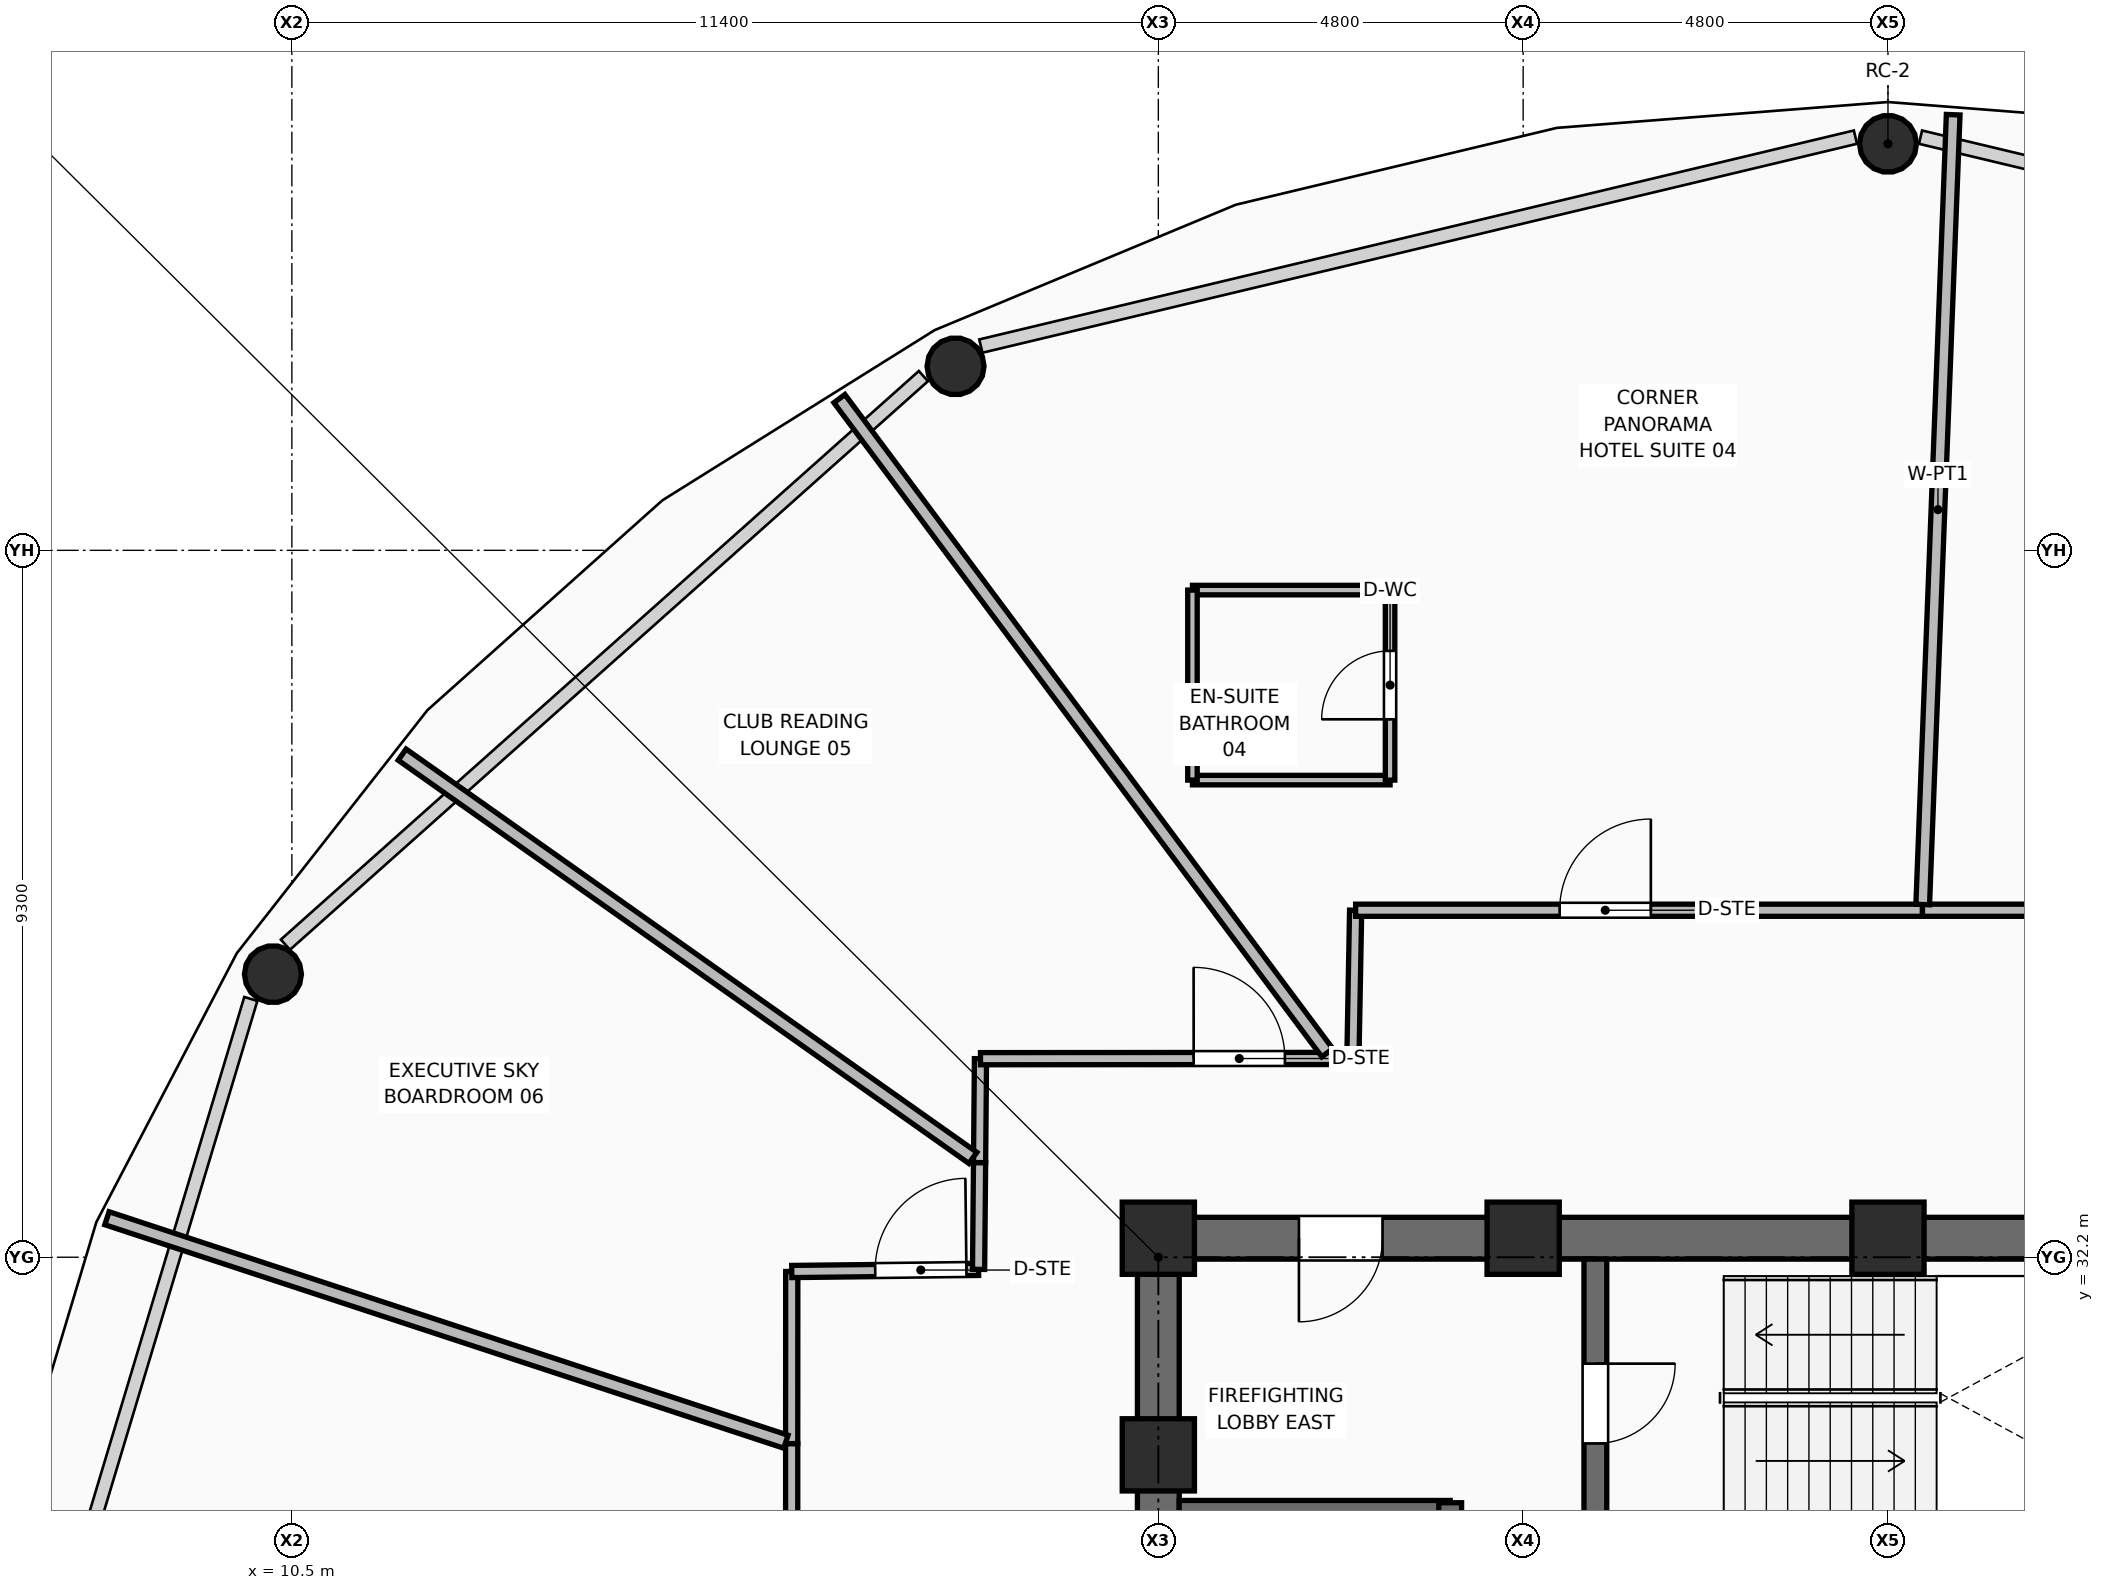
"""IFC4 building model, lengths in metres.
Left out: names, types, materials, properties, quantities, classifications, styles, units other than length and angle.
Written with IfcOpenShell. Run it as: python <this file> out.ifc"""

import sys

from ifc_helpers import new_model, si_unit, direction, frame, frame_2d, origin, origin_2d, place, context, subcontext, project, spatial, rectangle, hollow_circle, extrude, element, fill, save


model = new_model("IFC4")
c1 = context("Model", 3, precision=1e-05, world=origin(), true_north=direction((0.0, 1.0)))
c2 = subcontext(c1, "Body", "Model", "MODEL_VIEW")
j1 = project(units=[si_unit("LENGTHUNIT", "METRE"), si_unit("PLANEANGLEUNIT", "RADIAN")], contexts=[c1])
p1 = place(None, origin())
s1 = spatial("IfcSite", under=j1, at=p1, CompositionType="ELEMENT")
p2 = place(p1, origin())
s2 = spatial("IfcBuilding", under=s1, at=p2, CompositionType="ELEMENT")
p3 = place(p2, frame((0.0, 0.0, 168.45)))
s3 = spatial("IfcBuildingStorey", under=s2, at=p3, CompositionType="ELEMENT", Elevation=168.45)
for number, where, z_axis, x_axis in (
    (1, (21.9, 29.6, 0.0), (0.0, 0.0, 1.0), (1.0, 0.0, 0.0)),
    (2, (21.9, 32.45, 0.0), (0.0, 0.0, 1.0), (1.0, 0.0, 0.0)),
    (3, (26.7, 32.45, 0.0), (0.0, 0.0, 1.0), (1.0, 0.0, 0.0)),
    (4, (31.5, 32.45, 0.0), (0.0, 0.0, 1.0), (1.0, 0.0, 0.0)),
):
    element("IfcColumn", number, at=place(p3, frame(where, z_axis=z_axis, x_axis=x_axis)), inside=s3, PredefinedType="COLUMN", context=c2, shape_type="SweptSolid", body=[
        extrude(rectangle(XDim=0.95, YDim=0.95, at=origin_2d()), origin(), (0.0, 0.0, 1.0), 3.75),
    ])
for number, where, z_axis, x_axis in (
    (5, (31.5, 46.848, 0.0), (0.0, 0.0, 1.0), (1.0, 0.0, 0.0)),
    (6, (19.232, 43.921, 0.0), (0.0, 0.0, 1.0), (1.0, 0.0, 0.0)),
    (7, (10.251, 35.924, 0.0), (0.0, 0.0, 1.0), (1.0, 0.0, 0.0)),
):
    element("IfcColumn", number, at=place(p3, frame(where, z_axis=z_axis, x_axis=x_axis)), inside=s3, PredefinedType="COLUMN", context=c2, shape_type="SweptSolid", body=[
        extrude(hollow_circle(Radius=0.375, WallThickness=0.035, at=origin_2d()), origin(), (0.0, 0.0, 1.0), 3.57),
    ])
p4 = place(p3, frame((21.625, 32.45, 0.0), z_axis=(0.0, 0.0, 1.0), x_axis=(1.0, 0.0, 0.0)))
e8 = element("IfcWall", 8, at=p4, inside=s3, PredefinedType="SHEAR", context=c2, shape_type="SweptSolid", body=[
    extrude(rectangle(XDim=19.75, YDim=0.55, at=frame_2d((9.875, 0.0))), origin(), (0.0, 0.0, 1.0), 3.57),
])
p5 = place(p4, frame((2.125, 0.0, 0.0)))
e9 = element("IfcOpeningElement", 9, at=p5, cuts=e8, PredefinedType="OPENING", context=c2, shape_type="SweptSolid", body=[
    extrude(rectangle(XDim=1.1, YDim=2.1, at=frame_2d((0.55, 1.05))), frame((0.0, 0.285, 0.0), z_axis=(0.0, -1.0, 0.0), x_axis=(1.0, 0.0, 0.0)), (0.0, 0.0, 1.0), 0.57),
])
p6 = place(p4, frame((15.515, 0.0, 0.0)))
e10 = element("IfcOpeningElement", 10, at=p6, cuts=e8, PredefinedType="OPENING", context=c2, shape_type="SweptSolid", body=[
    extrude(rectangle(XDim=1.0, YDim=2.1, at=frame_2d((0.5, 1.05))), frame((0.0, 0.285, 0.0), z_axis=(0.0, -1.0, 0.0), x_axis=(1.0, 0.0, 0.0)), (0.0, 0.0, 1.0), 0.57),
])
p7 = place(p4, frame((17.525, 0.0, 0.0)))
e11 = element("IfcOpeningElement", 11, at=p7, cuts=e8, PredefinedType="OPENING", context=c2, shape_type="SweptSolid", body=[
    extrude(rectangle(XDim=0.9, YDim=2.1, at=frame_2d((0.45, 1.05))), frame((0.0, 0.285, 0.0), z_axis=(0.0, -1.0, 0.0), x_axis=(1.0, 0.0, 0.0)), (0.0, 0.0, 1.0), 0.57),
])
p8 = place(p3, frame((21.9, 18.075, 0.0), z_axis=(0.0, 0.0, 1.0), x_axis=(0.0, 1.0, 0.0)))
e12 = element("IfcWall", 12, at=p8, inside=s3, PredefinedType="SHEAR", context=c2, shape_type="SweptSolid", body=[
    extrude(rectangle(XDim=14.1, YDim=0.55, at=frame_2d((7.05, 0.0))), origin(), (0.0, 0.0, 1.0), 3.57),
])
p9 = place(p3, frame((22.175, 28.85, 0.0), z_axis=(0.0, 0.0, 1.0), x_axis=(1.0, 0.0, 0.0)))
e13 = element("IfcWall", 13, at=p9, inside=s3, PredefinedType="SHEAR", context=c2, shape_type="SweptSolid", body=[
    extrude(rectangle(XDim=3.565, YDim=0.3, at=frame_2d((1.782, 0.0))), origin(), (0.0, 0.0, 1.0), 3.57),
])
p10 = place(p3, frame((25.74, 20.98, 0.0), z_axis=(0.0, 0.0, 1.0), x_axis=(0.0, 1.0, 0.0)))
e14 = element("IfcWall", 14, at=p10, inside=s3, PredefinedType="SHEAR", context=c2, shape_type="SweptSolid", body=[
    extrude(rectangle(XDim=7.99, YDim=0.3, at=frame_2d((3.995, 0.0))), origin(), (0.0, 0.0, 1.0), 3.57),
])
p11 = place(p3, frame((27.65, 28.75, 0.0), z_axis=(0.0, 0.0, 1.0), x_axis=(0.0, 1.0, 0.0)))
e15 = element("IfcWall", 15, at=p11, inside=s3, PredefinedType="SHEAR", context=c2, shape_type="SweptSolid", body=[
    extrude(rectangle(XDim=3.425, YDim=0.3, at=frame_2d((1.712, 0.0))), origin(), (0.0, 0.0, 1.0), 3.57),
])
p12 = place(p11, frame((1.0, 0.0, 0.0)))
e16 = element("IfcOpeningElement", 16, at=p12, cuts=e15, PredefinedType="OPENING", context=c2, shape_type="SweptSolid", body=[
    extrude(rectangle(XDim=1.05, YDim=2.1, at=frame_2d((0.525, 1.05))), frame((0.0, 0.16, 0.0), z_axis=(0.0, -1.0, 0.0), x_axis=(1.0, 0.0, 0.0)), (0.0, 0.0, 1.0), 0.32),
])
p13 = place(p3, frame((17.076, 26.142, 0.0), z_axis=(0.0, 0.0, 1.0), x_axis=(0.0, 1.0, 0.0)))
e17 = element("IfcWall", 17, at=p13, inside=s3, PredefinedType="PARTITIONING", context=c2, shape_type="SweptSolid", body=[
    extrude(rectangle(XDim=3.606, YDim=0.16, at=frame_2d((1.803, 0.0))), origin(), (0.0, 0.0, 1.0), 3.55),
])
p14 = place(p3, frame((17.076, 29.748, 0.0), z_axis=(0.0, 0.0, 1.0), x_axis=(0.000431359822, 0.999999906964, 0.0)))
e18 = element("IfcWall", 18, at=p14, inside=s3, PredefinedType="PARTITIONING", context=c2, shape_type="SweptSolid", body=[
    extrude(rectangle(XDim=2.264, YDim=0.16, at=frame_2d((1.132, 0.0))), origin(), (0.0, 0.0, 1.0), 3.55),
])
p15 = place(p3, frame((17.077, 32.012, 0.0), z_axis=(0.0, 0.0, 1.0), x_axis=(0.999934771592, 0.011421583108, 0.0)))
e19 = element("IfcWall", 19, at=p15, inside=s3, PredefinedType="PARTITIONING", context=c2, shape_type="SweptSolid", body=[
    extrude(rectangle(XDim=2.458, YDim=0.16, at=frame_2d((1.229, 0.0))), origin(), (0.0, 0.0, 1.0), 3.55),
])
p16 = place(p15, frame((1.098, 0.0, 0.0)))
e20 = element("IfcOpeningElement", 20, at=p16, cuts=e19, PredefinedType="OPENING", context=c2, shape_type="SweptSolid", body=[
    extrude(rectangle(XDim=1.2, YDim=2.1, at=frame_2d((0.6, 1.05))), frame((0.0, 0.09, 0.0), z_axis=(0.0, -1.0, 0.0), x_axis=(1.0, 0.0, 0.0)), (0.0, 0.0, 1.0), 0.18),
])
p17 = place(p3, frame((19.535, 32.04, 0.0), z_axis=(0.0, 0.0, 1.0), x_axis=(0.009382732056, 0.999955981201, 0.0)))
e21 = element("IfcWall", 21, at=p17, inside=s3, PredefinedType="PARTITIONING", context=c2, shape_type="SweptSolid", body=[
    extrude(rectangle(XDim=1.405, YDim=0.16, at=frame_2d((0.703, 0.0))), origin(), (0.0, 0.0, 1.0), 3.006),
])
p18 = place(p3, frame((19.548, 33.445, 0.0), z_axis=(0.0, 0.0, 1.0), x_axis=(0.008751227658, 0.999961707274, 0.0)))
e22 = element("IfcWall", 22, at=p18, inside=s3, PredefinedType="PARTITIONING", context=c2, shape_type="SweptSolid", body=[
    extrude(rectangle(XDim=1.367, YDim=0.16, at=frame_2d((0.684, 0.0))), origin(), (0.0, 0.0, 1.0), 3.55),
])
p19 = place(p3, frame((19.56, 34.812, 0.0), z_axis=(0.0, 0.0, 1.0), x_axis=(0.999999821253, 0.000597907217, 0.0)))
e23 = element("IfcWall", 23, at=p19, inside=s3, PredefinedType="PARTITIONING", context=c2, shape_type="SweptSolid", body=[
    extrude(rectangle(XDim=4.9, YDim=0.16, at=frame_2d((2.45, 0.0))), origin(), (0.0, 0.0, 1.0), 3.006),
])
p20 = place(p19, frame((2.805, 0.0, 0.0)))
e24 = element("IfcOpeningElement", 24, at=p20, cuts=e23, PredefinedType="OPENING", context=c2, shape_type="SweptSolid", body=[
    extrude(rectangle(XDim=1.2, YDim=2.1, at=frame_2d((0.6, 1.05))), frame((0.0, 0.09, 0.0), z_axis=(0.0, -1.0, 0.0), x_axis=(1.0, 0.0, 0.0)), (0.0, 0.0, 1.0), 0.18),
])
p21 = place(p3, frame((24.46, 34.815, 0.0), z_axis=(0.0, 0.0, 1.0), x_axis=(0.018526930954, 0.999828361685, 0.0)))
e25 = element("IfcWall", 25, at=p21, inside=s3, PredefinedType="PARTITIONING", context=c2, shape_type="SweptSolid", body=[
    extrude(rectangle(XDim=1.95, YDim=0.16, at=frame_2d((0.975, 0.0))), origin(), (0.0, 0.0, 1.0), 3.55),
])
p22 = place(p3, frame((24.496, 36.765, 0.0), z_axis=(0.0, 0.0, 1.0), x_axis=(1.0, 0.0, 0.0)))
e26 = element("IfcWall", 26, at=p22, inside=s3, PredefinedType="PARTITIONING", context=c2, shape_type="SweptSolid", body=[
    extrude(rectangle(XDim=7.458, YDim=0.16, at=frame_2d((3.729, 0.0))), origin(), (0.0, 0.0, 1.0), 3.006),
])
p23 = place(p22, frame((2.684, 0.0, 0.0)))
e27 = element("IfcOpeningElement", 27, at=p23, cuts=e26, PredefinedType="OPENING", context=c2, shape_type="SweptSolid", body=[
    extrude(rectangle(XDim=1.2, YDim=2.1, at=frame_2d((0.6, 1.05))), frame((0.0, 0.09, 0.0), z_axis=(0.0, -1.0, 0.0), x_axis=(1.0, 0.0, 0.0)), (0.0, 0.0, 1.0), 0.18),
])
p24 = place(p3, frame((31.954, 36.765, 0.0), z_axis=(0.0, 0.0, 1.0), x_axis=(1.0, 0.0, 0.0)))
e28 = element("IfcWall", 28, at=p24, inside=s3, PredefinedType="PARTITIONING", context=c2, shape_type="SweptSolid", body=[
    extrude(rectangle(XDim=6.546, YDim=0.16, at=frame_2d((3.273, 0.0))), origin(), (0.0, 0.0, 1.0), 3.55),
])
p25 = place(p24, frame((3.708, 0.0, 0.0)))
e29 = element("IfcOpeningElement", 29, at=p25, cuts=e28, PredefinedType="OPENING", context=c2, shape_type="SweptSolid", body=[
    extrude(rectangle(XDim=1.2, YDim=2.1, at=frame_2d((0.6, 1.05))), frame((0.0, 0.09, 0.0), z_axis=(0.0, -1.0, 0.0), x_axis=(1.0, 0.0, 0.0)), (0.0, 0.0, 1.0), 0.18),
])
p26 = place(p3, frame((31.957, 36.84, 0.0), z_axis=(0.0, 0.0, 1.0), x_axis=(0.038551241221, 0.999256624597, 0.0)))
e30 = element("IfcWall", 30, at=p26, inside=s3, PredefinedType="PARTITIONING", context=c2, shape_type="SweptSolid", body=[
    extrude(rectangle(XDim=10.399, YDim=0.18, at=frame_2d((5.199, 0.0))), origin(), (0.0, 0.0, 1.0), 2.852),
])
p27 = place(p3, frame((24.123, 34.89, 0.0), z_axis=(0.0, 0.0, 1.0), x_axis=(-0.597869450308, 0.80159348824, 0.0)))
e31 = element("IfcWall", 31, at=p27, inside=s3, PredefinedType="PARTITIONING", context=c2, shape_type="SweptSolid", body=[
    extrude(rectangle(XDim=10.736, YDim=0.18, at=frame_2d((5.368, 0.0))), origin(), (0.0, 0.0, 1.0), 2.852),
])
p28 = place(p3, frame((19.46, 33.507, 0.0), z_axis=(0.0, 0.0, 1.0), x_axis=(-0.816740398998, 0.577005303827, 0.0)))
e32 = element("IfcWall", 32, at=p28, inside=s3, PredefinedType="PARTITIONING", context=c2, shape_type="SweptSolid", body=[
    extrude(rectangle(XDim=9.194, YDim=0.18, at=frame_2d((4.597, 0.0))), origin(), (0.0, 0.0, 1.0), 2.852),
])
p29 = place(p3, frame((17.0, 29.773, 0.0), z_axis=(0.0, 0.0, 1.0), x_axis=(-0.949880965401, 0.312611822502, 0.0)))
e33 = element("IfcWall", 33, at=p29, inside=s3, PredefinedType="PARTITIONING", context=c2, shape_type="SweptSolid", body=[
    extrude(rectangle(XDim=9.405, YDim=0.18, at=frame_2d((4.702, 0.0))), origin(), (0.0, 0.0, 1.0), 2.852),
])
for number, where, z_axis, x_axis in (
    (34, (22.349, 38.477, 0.0), (0.0, 0.0, 1.0), (1.0, 0.0, 0.0)),
    (35, (22.349, 40.977, 0.0), (0.0, 0.0, 1.0), (1.0, 0.0, 0.0)),
):
    element("IfcWall", number, at=place(p3, frame(where, z_axis=z_axis, x_axis=x_axis)), inside=s3, PredefinedType="PARTITIONING", context=c2, shape_type="SweptSolid", body=[
        extrude(rectangle(XDim=2.6, YDim=0.125, at=frame_2d((1.3, 0.0))), origin(), (0.0, 0.0, 1.0), 3.55),
    ])
p30 = place(p3, frame((22.349, 38.477, 0.0), z_axis=(0.0, 0.0, 1.0), x_axis=(0.0, 1.0, 0.0)))
e36 = element("IfcWall", 36, at=p30, inside=s3, PredefinedType="PARTITIONING", context=c2, shape_type="SweptSolid", body=[
    extrude(rectangle(XDim=2.5, YDim=0.125, at=frame_2d((1.25, 0.0))), origin(), (0.0, 0.0, 1.0), 3.55),
])
p31 = place(p3, frame((24.949, 38.477, 0.0), z_axis=(0.0, 0.0, 1.0), x_axis=(0.0, 1.0, 0.0)))
e37 = element("IfcWall", 37, at=p31, inside=s3, PredefinedType="PARTITIONING", context=c2, shape_type="SweptSolid", body=[
    extrude(rectangle(XDim=2.5, YDim=0.125, at=frame_2d((1.25, 0.0))), origin(), (0.0, 0.0, 1.0), 3.55),
])
p32 = place(p31, frame((0.8, 0.0, 0.0)))
e38 = element("IfcOpeningElement", 38, at=p32, cuts=e37, PredefinedType="OPENING", context=c2, shape_type="SweptSolid", body=[
    extrude(rectangle(XDim=0.9, YDim=2.1, at=frame_2d((0.45, 1.05))), frame((0.0, 0.073, 0.0), z_axis=(0.0, -1.0, 0.0), x_axis=(1.0, 0.0, 0.0)), (0.0, 0.0, 1.0), 0.145),
])
p33 = place(p12, frame((1.05, 0.0, 0.0), z_axis=(0.0, 0.0, 1.0), x_axis=(-1.0, 0.0, 0.0)))
e39 = element("IfcDoor", 39, at=p33, inside=s3, OperationType="SINGLE_SWING_LEFT", PredefinedType="DOOR", context=c2, shape_type="SweptSolid", body=[
    extrude(rectangle(XDim=1.05, YDim=2.1, at=frame_2d((0.525, 1.05))), frame((0.0, 0.025, 0.0), z_axis=(0.0, -1.0, 0.0), x_axis=(1.0, 0.0, 0.0)), (0.0, 0.0, 1.0), 0.05),
])
fill(e16, e39)
p34 = place(p5, frame((1.1, 0.0, 0.0), z_axis=(0.0, 0.0, 1.0), x_axis=(-1.0, 0.0, 0.0)))
e40 = element("IfcDoor", 40, at=p34, inside=s3, OperationType="SINGLE_SWING_RIGHT", PredefinedType="DOOR", context=c2, shape_type="SweptSolid", body=[
    extrude(rectangle(XDim=1.1, YDim=2.1, at=frame_2d((0.55, 1.05))), frame((0.0, 0.025, 0.0), z_axis=(0.0, -1.0, 0.0), x_axis=(1.0, 0.0, 0.0)), (0.0, 0.0, 1.0), 0.05),
])
fill(e9, e40)
p35 = place(p32, origin())
e41 = element("IfcDoor", 41, at=p35, inside=s3, OperationType="SINGLE_SWING_LEFT", PredefinedType="DOOR", context=c2, shape_type="SweptSolid", body=[
    extrude(rectangle(XDim=0.9, YDim=2.1, at=frame_2d((0.45, 1.05))), frame((0.0, 0.025, 0.0), z_axis=(0.0, -1.0, 0.0), x_axis=(1.0, 0.0, 0.0)), (0.0, 0.0, 1.0), 0.05),
])
fill(e38, e41)
p36 = place(p23, origin())
e42 = element("IfcDoor", 42, at=p36, inside=s3, OperationType="SINGLE_SWING_RIGHT", PredefinedType="DOOR", context=c2, shape_type="SweptSolid", body=[
    extrude(rectangle(XDim=1.2, YDim=2.1, at=frame_2d((0.6, 1.05))), frame((0.0, 0.025, 0.0), z_axis=(0.0, -1.0, 0.0), x_axis=(1.0, 0.0, 0.0)), (0.0, 0.0, 1.0), 0.05),
])
fill(e27, e42)
p37 = place(p20, origin())
e43 = element("IfcDoor", 43, at=p37, inside=s3, OperationType="SINGLE_SWING_LEFT", PredefinedType="DOOR", context=c2, shape_type="SweptSolid", body=[
    extrude(rectangle(XDim=1.2, YDim=2.1, at=frame_2d((0.6, 1.05))), frame((0.0, 0.025, 0.0), z_axis=(0.0, -1.0, 0.0), x_axis=(1.0, 0.0, 0.0)), (0.0, 0.0, 1.0), 0.05),
])
fill(e24, e43)
p38 = place(p16, origin())
e44 = element("IfcDoor", 44, at=p38, inside=s3, OperationType="SINGLE_SWING_RIGHT", PredefinedType="DOOR", context=c2, shape_type="SweptSolid", body=[
    extrude(rectangle(XDim=1.2, YDim=2.1, at=frame_2d((0.6, 1.05))), frame((0.0, 0.025, 0.0), z_axis=(0.0, -1.0, 0.0), x_axis=(1.0, 0.0, 0.0)), (0.0, 0.0, 1.0), 0.05),
])
fill(e20, e44)
save(model, sys.argv[1])
